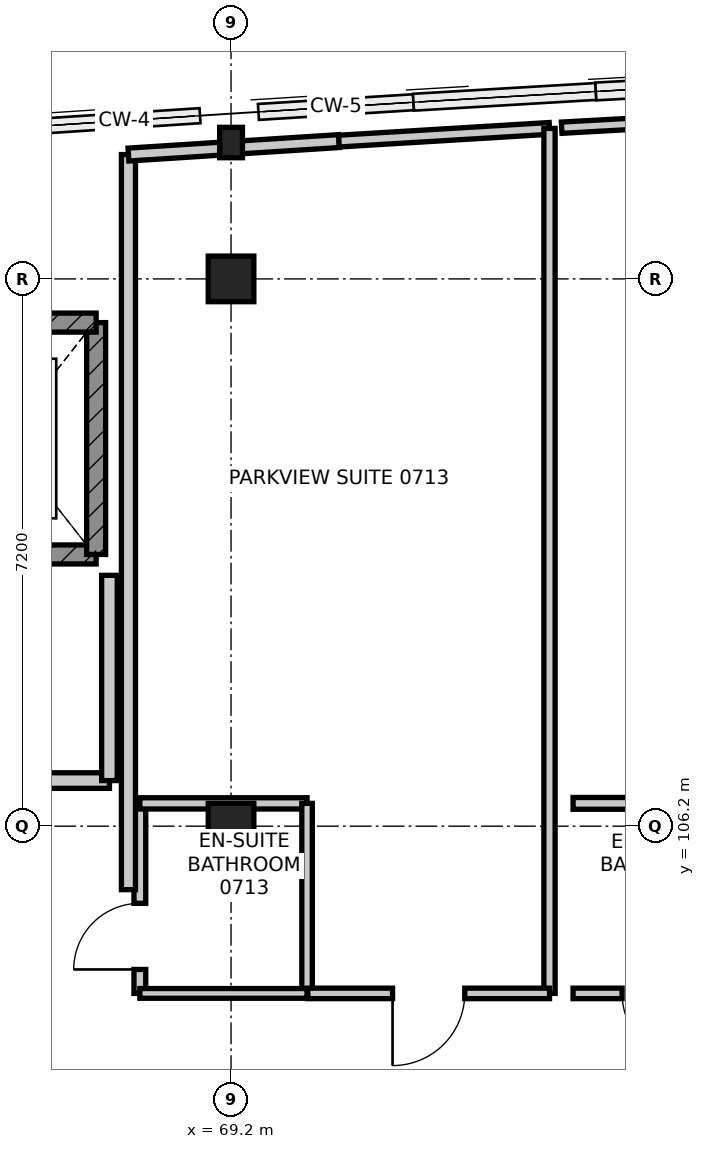
"""IFC4 building model, lengths in metres.
Left out: names, types, materials, properties, quantities, classifications, styles, units other than length and angle.
Written with IfcOpenShell. Run it as: python <this file> out.ifc"""

import sys

from ifc_helpers import new_model, si_unit, direction, frame, frame_2d, origin, origin_2d, place, context, subcontext, project, spatial, rectangle, i_section, extrude, element, fill, save


model = new_model("IFC4")
c1 = context("Model", 3, precision=1e-05, world=origin(), true_north=direction((0.0, 1.0)))
c2 = subcontext(c1, "Body", "Model", "MODEL_VIEW")
j1 = project(units=[si_unit("LENGTHUNIT", "METRE"), si_unit("PLANEANGLEUNIT", "RADIAN")], contexts=[c1])
p1 = place(None, origin())
s1 = spatial("IfcSite", under=j1, at=p1, CompositionType="ELEMENT")
p2 = place(p1, origin())
s2 = spatial("IfcBuilding", under=s1, at=p2, CompositionType="ELEMENT")
p3 = place(p2, frame((0.0, 0.0, 30.0)))
s3 = spatial("IfcBuildingStorey", under=s2, at=p3, CompositionType="ELEMENT", Elevation=30.0)
for number, where, z_axis, x_axis in (
    (1, (69.2, 106.2, 0.0), (0.0, 0.0, 1.0), (1.0, 0.0, 0.0)),
    (2, (69.2, 113.4, 0.0), (0.0, 0.0, 1.0), (1.0, 0.0, 0.0)),
):
    element("IfcColumn", number, at=place(p3, frame(where, z_axis=z_axis, x_axis=x_axis)), inside=s3, PredefinedType="COLUMN", context=c2, shape_type="SweptSolid", body=[
        extrude(rectangle(XDim=0.6, YDim=0.6, at=origin_2d()), origin(), (0.0, 0.0, 1.0), 3.6),
    ])
p4 = place(p3, frame((69.2, 115.194, 0.0), z_axis=(0.0, 0.0, 1.0), x_axis=(1.0, 0.0, 0.0)))
e3 = element("IfcColumn", 3, at=p4, inside=s3, PredefinedType="COLUMN", context=c2, shape_type="SweptSolid", body=[
    extrude(i_section(OverallWidth=0.3, OverallDepth=0.4, WebThickness=0.013, FlangeThickness=0.024, FilletRadius=0.027, at=origin_2d()), origin(), (0.0, 0.0, 1.0), 3.6),
])
p5 = place(p3, frame((64.975, 109.775, 0.0), z_axis=(0.0, 0.0, 1.0), x_axis=(1.0, 0.0, 0.0)))
e4 = element("IfcWall", 4, at=p5, inside=s3, PredefinedType="SHEAR", context=c2, shape_type="SweptSolid", body=[
    extrude(rectangle(XDim=2.45, YDim=0.25, at=frame_2d((1.225, 0.0))), origin(), (0.0, 0.0, 1.0), 3.36),
])
p6 = place(p5, frame((0.725, 0.0, 0.0)))
e5 = element("IfcOpeningElement", 5, at=p6, cuts=e4, PredefinedType="OPENING", context=c2, shape_type="SweptSolid", body=[
    extrude(rectangle(XDim=1.0, YDim=2.15, at=frame_2d((0.5, 1.075))), frame((0.0, 0.135, 0.0), z_axis=(0.0, -1.0, 0.0), x_axis=(1.0, 0.0, 0.0)), (0.0, 0.0, 1.0), 0.27),
])
p7 = place(p3, frame((67.425, 109.775, 0.0), z_axis=(0.0, 0.0, 1.0), x_axis=(0.0, 1.0, 0.0)))
e6 = element("IfcWall", 6, at=p7, inside=s3, PredefinedType="SHEAR", context=c2, shape_type="SweptSolid", body=[
    extrude(rectangle(XDim=3.05, YDim=0.25, at=frame_2d((1.525, 0.0))), origin(), (0.0, 0.0, 1.0), 3.36),
])
p8 = place(p3, frame((67.425, 112.825, 0.0), z_axis=(0.0, 0.0, 1.0), x_axis=(-1.0, 0.0, 0.0)))
e7 = element("IfcWall", 7, at=p8, inside=s3, PredefinedType="SHEAR", context=c2, shape_type="SweptSolid", body=[
    extrude(rectangle(XDim=2.45, YDim=0.25, at=frame_2d((1.225, 0.0))), origin(), (0.0, 0.0, 1.0), 3.36),
])
p9 = place(p3, frame((62.6, 106.8, 0.0), z_axis=(0.0, 0.0, 1.0), x_axis=(1.0, 0.0, 0.0)))
e8 = element("IfcWall", 8, at=p9, inside=s3, PredefinedType="PARTITIONING", context=c2, shape_type="SweptSolid", body=[
    extrude(rectangle(XDim=5.0, YDim=0.205, at=frame_2d((2.5, 0.0))), origin(), (0.0, 0.0, 1.0), 3.36),
])
p10 = place(p9, frame((1.9, 0.0, 0.0)))
e9 = element("IfcOpeningElement", 9, at=p10, cuts=e8, PredefinedType="OPENING", context=c2, shape_type="SweptSolid", body=[
    extrude(rectangle(XDim=1.2, YDim=2.1, at=frame_2d((0.6, 1.05))), frame((0.0, 0.113, 0.0), z_axis=(0.0, -1.0, 0.0), x_axis=(1.0, 0.0, 0.0)), (0.0, 0.0, 1.0), 0.225),
])
p11 = place(p3, frame((67.6, 106.8, 0.0), z_axis=(0.0, 0.0, 1.0), x_axis=(0.0, 1.0, 0.0)))
e10 = element("IfcWall", 10, at=p11, inside=s3, PredefinedType="PARTITIONING", context=c2, shape_type="SweptSolid", body=[
    extrude(rectangle(XDim=2.7, YDim=0.205, at=frame_2d((1.35, 0.0))), origin(), (0.0, 0.0, 1.0), 3.36),
])
p12 = place(p3, frame((68.0, 104.0, 0.0), z_axis=(0.0, 0.0, 1.0), x_axis=(0.0, 1.0, 0.0)))
e11 = element("IfcWall", 11, at=p12, inside=s3, PredefinedType="PARTITIONING", context=c2, shape_type="SweptSolid", body=[
    extrude(rectangle(XDim=2.5, YDim=0.155, at=frame_2d((1.25, 0.0))), origin(), (0.0, 0.0, 1.0), 2.745),
])
p13 = place(p12, frame((0.315, 0.0, 0.0)))
e12 = element("IfcOpeningElement", 12, at=p13, cuts=e11, PredefinedType="OPENING", context=c2, shape_type="SweptSolid", body=[
    extrude(rectangle(XDim=0.87, YDim=2.07, at=frame_2d((0.435, 1.035))), frame((0.0, 0.087, 0.0), z_axis=(0.0, -1.0, 0.0), x_axis=(1.0, 0.0, 0.0)), (0.0, 0.0, 1.0), 0.175),
])
p14 = place(p3, frame((68.0, 106.5, 0.0), z_axis=(0.0, 0.0, 1.0), x_axis=(1.0, 0.0, 0.0)))
e13 = element("IfcWall", 13, at=p14, inside=s3, PredefinedType="PARTITIONING", context=c2, shape_type="SweptSolid", body=[
    extrude(rectangle(XDim=2.2, YDim=0.148, at=frame_2d((1.1, 0.0))), origin(), (0.0, 0.0, 1.0), 2.695),
])
p15 = place(p3, frame((70.2, 106.5, 0.0), z_axis=(0.0, 0.0, 1.0), x_axis=(0.0, -1.0, 0.0)))
e14 = element("IfcWall", 14, at=p15, inside=s3, PredefinedType="PARTITIONING", context=c2, shape_type="SweptSolid", body=[
    extrude(rectangle(XDim=2.5, YDim=0.138, at=frame_2d((1.25, 0.0))), origin(), (0.0, 0.0, 1.0), 2.745),
])
p16 = place(p3, frame((70.2, 104.0, 0.0), z_axis=(0.0, 0.0, 1.0), x_axis=(-1.0, 0.0, 0.0)))
e15 = element("IfcWall", 15, at=p16, inside=s3, PredefinedType="PARTITIONING", context=c2, shape_type="SweptSolid", body=[
    extrude(rectangle(XDim=2.2, YDim=0.128, at=frame_2d((1.1, 0.0))), origin(), (0.0, 0.0, 1.0), 2.695),
])
p17 = place(p3, frame((67.85, 105.365, 0.0), z_axis=(0.0, 0.0, 1.0), x_axis=(0.0, 1.0, 0.0)))
e16 = element("IfcWall", 16, at=p17, inside=s3, PredefinedType="PARTITIONING", context=c2, shape_type="SweptSolid", body=[
    extrude(rectangle(XDim=9.671, YDim=0.185, at=frame_2d((4.835, 0.0))), origin(), (0.0, 0.0, 1.0), 2.745),
])
p18 = place(p3, frame((67.85, 115.036, 0.0), z_axis=(0.0, 0.0, 1.0), x_axis=(0.997959077282, 0.063856715151, 0.0)))
e17 = element("IfcWall", 17, at=p18, inside=s3, PredefinedType="PARTITIONING", context=c2, shape_type="SweptSolid", body=[
    extrude(rectangle(XDim=2.776, YDim=0.17, at=frame_2d((1.388, 0.0))), origin(), (0.0, 0.0, 1.0), 2.936),
])
p19 = place(p3, frame((70.62, 115.213, 0.0), z_axis=(0.0, 0.0, 1.0), x_axis=(0.998192726689, 0.06009392969, 0.0)))
e18 = element("IfcWall", 18, at=p19, inside=s3, PredefinedType="PARTITIONING", context=c2, shape_type="SweptSolid", body=[
    extrude(rectangle(XDim=2.775, YDim=0.155, at=frame_2d((1.387, 0.0))), origin(), (0.0, 0.0, 1.0), 2.936),
])
p20 = place(p3, frame((73.39, 115.38, 0.0), z_axis=(0.0, 0.0, 1.0), x_axis=(0.0, -1.0, 0.0)))
e19 = element("IfcWall", 19, at=p20, inside=s3, PredefinedType="PARTITIONING", context=c2, shape_type="SweptSolid", body=[
    extrude(rectangle(XDim=11.38, YDim=0.148, at=frame_2d((5.69, 0.0))), origin(), (0.0, 0.0, 1.0), 2.745),
])
p21 = place(p3, frame((73.39, 104.0, 0.0), z_axis=(0.0, 0.0, 1.0), x_axis=(-1.0, 0.0, 0.0)))
e20 = element("IfcWall", 20, at=p21, inside=s3, PredefinedType="PARTITIONING", context=c2, shape_type="SweptSolid", body=[
    extrude(rectangle(XDim=3.18, YDim=0.138, at=frame_2d((1.59, 0.0))), origin(), (0.0, 0.0, 1.0), 3.36),
])
p22 = place(p21, frame((1.115, 0.0, 0.0)))
e21 = element("IfcOpeningElement", 21, at=p22, cuts=e20, PredefinedType="OPENING", context=c2, shape_type="SweptSolid", body=[
    extrude(rectangle(XDim=0.95, YDim=2.1, at=frame_2d((0.475, 1.05))), frame((0.0, 0.079, 0.0), z_axis=(0.0, -1.0, 0.0), x_axis=(1.0, 0.0, 0.0)), (0.0, 0.0, 1.0), 0.158),
])
p23 = place(p3, frame((73.7, 106.5, 0.0), z_axis=(0.0, 0.0, 1.0), x_axis=(1.0, 0.0, 0.0)))
e22 = element("IfcWall", 22, at=p23, inside=s3, PredefinedType="PARTITIONING", context=c2, shape_type="SweptSolid", body=[
    extrude(rectangle(XDim=2.2, YDim=0.155, at=frame_2d((1.1, 0.0))), origin(), (0.0, 0.0, 1.0), 3.36),
])
p24 = place(p3, frame((75.9, 104.0, 0.0), z_axis=(0.0, 0.0, 1.0), x_axis=(-1.0, 0.0, 0.0)))
e23 = element("IfcWall", 23, at=p24, inside=s3, PredefinedType="PARTITIONING", context=c2, shape_type="SweptSolid", body=[
    extrude(rectangle(XDim=2.2, YDim=0.138, at=frame_2d((1.1, 0.0))), origin(), (0.0, 0.0, 1.0), 3.36),
])
p25 = place(p24, frame((0.645, 0.0, 0.0)))
e24 = element("IfcOpeningElement", 24, at=p25, cuts=e23, PredefinedType="OPENING", context=c2, shape_type="SweptSolid", body=[
    extrude(rectangle(XDim=0.91, YDim=2.11, at=frame_2d((0.455, 1.055))), frame((0.0, 0.079, 0.0), z_axis=(0.0, -1.0, 0.0), x_axis=(1.0, 0.0, 0.0)), (0.0, 0.0, 1.0), 0.158),
])
p26 = place(p3, frame((73.55, 115.389, 0.0), z_axis=(0.0, 0.0, 1.0), x_axis=(0.998463152475, 0.0554196098, 0.0)))
e25 = element("IfcWall", 25, at=p26, inside=s3, PredefinedType="PARTITIONING", context=c2, shape_type="SweptSolid", body=[
    extrude(rectangle(XDim=2.414, YDim=0.148, at=frame_2d((1.207, 0.0))), origin(), (0.0, 0.0, 1.0), 2.936),
])
p27 = place(p13, origin())
e26 = element("IfcDoor", 26, at=p27, inside=s3, OperationType="SINGLE_SWING_LEFT", PredefinedType="DOOR", context=c2, shape_type="SweptSolid", body=[
    extrude(rectangle(XDim=0.87, YDim=2.07, at=frame_2d((0.435, 1.035))), frame((0.0, 0.025, 0.0), z_axis=(0.0, -1.0, 0.0), x_axis=(1.0, 0.0, 0.0)), (0.0, 0.0, 1.0), 0.05),
])
fill(e12, e26)
p28 = place(p22, origin())
e27 = element("IfcDoor", 27, at=p28, inside=s3, OperationType="SINGLE_SWING_RIGHT", PredefinedType="DOOR", context=c2, shape_type="SweptSolid", body=[
    extrude(rectangle(XDim=0.95, YDim=2.1, at=frame_2d((0.475, 1.05))), frame((0.0, 0.025, 0.0), z_axis=(0.0, -1.0, 0.0), x_axis=(1.0, 0.0, 0.0)), (0.0, 0.0, 1.0), 0.05),
])
fill(e21, e27)
p29 = place(p25, origin())
e28 = element("IfcDoor", 28, at=p29, inside=s3, OperationType="SINGLE_SWING_LEFT", PredefinedType="DOOR", context=c2, shape_type="SweptSolid", body=[
    extrude(rectangle(XDim=0.91, YDim=2.11, at=frame_2d((0.455, 1.055))), frame((0.0, 0.025, 0.0), z_axis=(0.0, -1.0, 0.0), x_axis=(1.0, 0.0, 0.0)), (0.0, 0.0, 1.0), 0.05),
])
fill(e24, e28)
save(model, sys.argv[1])
